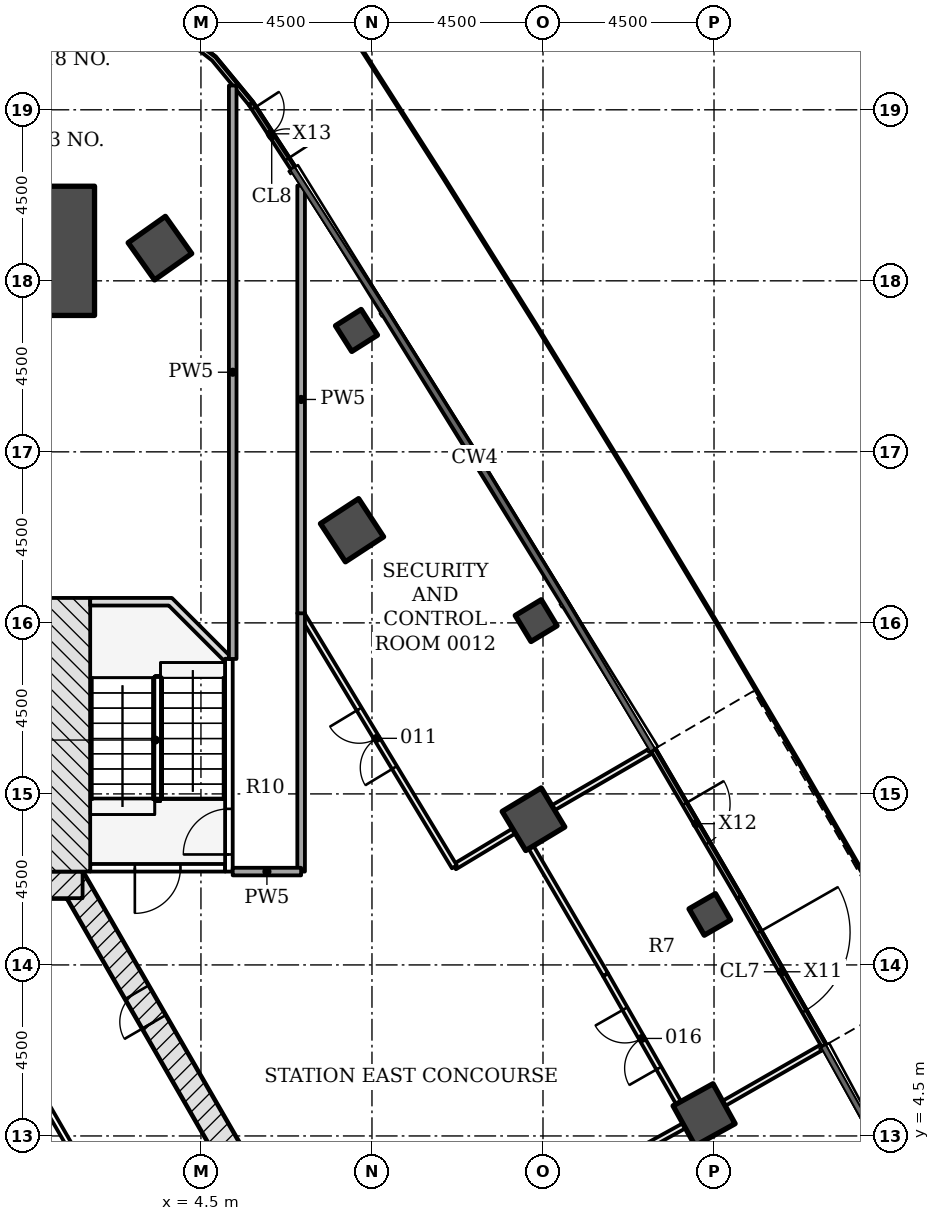
"""IFC4 building model, lengths in metres.
Left out: names, types, materials, properties, quantities, classifications, styles, units other than length and angle.
Written with IfcOpenShell. Run it as: python <this file> out.ifc"""

import sys

from ifc_helpers import new_model, si_unit, direction, frame, frame_2d, origin, origin_2d, place, context, subcontext, project, spatial, polyline, rectangle, outline, extrude, element, fill, save


model = new_model("IFC4")
c1 = context("Model", 3, precision=1e-05, world=origin(), true_north=direction((0.0, 1.0)))
c2 = subcontext(c1, "Body", "Model", "MODEL_VIEW")
j1 = project(units=[si_unit("LENGTHUNIT", "METRE"), si_unit("PLANEANGLEUNIT", "RADIAN")], contexts=[c1])
p1 = place(None, origin())
s1 = spatial("IfcSite", under=j1, at=p1, CompositionType="ELEMENT")
p2 = place(p1, origin())
s2 = spatial("IfcBuilding", under=s1, at=p2, CompositionType="ELEMENT")
p3 = place(p2, origin())
s3 = spatial("IfcBuildingStorey", under=s2, at=p3, CompositionType="ELEMENT", Elevation=0.0)
for number, where, z_axis, x_axis in (
    (1, (17.739, 5.058, -0.25), (0.0, 0.0, 1.0), (0.875, 0.484, 0.0)),
    (2, (13.25, 12.834, -0.25), (0.0, 0.0, 1.0), (0.857, 0.516, 0.0)),
    (3, (8.475, 20.438, -0.25), (0.0, 0.0, 1.0), (0.837, 0.547, 0.0)),
    (4, (3.421, 27.86, -0.25), (0.0, 0.0, 1.0), (0.816, 0.578, 0.0)),
):
    element("IfcColumn", number, at=place(p3, frame(where, z_axis=z_axis, x_axis=x_axis)), inside=s3, PredefinedType="COLUMN", context=c2, shape_type="SweptSolid", body=[
        extrude(rectangle(XDim=1.2, YDim=1.2, at=origin_2d()), origin(), (0.0, 0.0, 1.0), 6.0),
    ])
for number, where, z_axis, x_axis in (
    (5, (17.89, 10.329, -0.25), (0.0, 0.0, 1.0), (0.866, 0.5, 0.0)),
    (6, (13.32, 18.059, -0.25), (0.0, 0.0, 1.0), (0.856, 0.518, 0.0)),
    (7, (8.592, 25.695, -0.25), (0.0, 0.0, 1.0), (0.845, 0.535, 0.0)),
):
    element("IfcColumn", number, at=place(p3, frame(where, z_axis=z_axis, x_axis=x_axis)), inside=s3, PredefinedType="COLUMN", context=c2, shape_type="SweptSolid", body=[
        extrude(rectangle(XDim=0.8, YDim=0.8, at=origin_2d()), origin(), (0.0, 0.0, 1.0), 6.0),
    ])
p4 = place(p3, frame((10.311, -4.703, -0.25), z_axis=(0.0, 0.0, 1.0), x_axis=(-0.500001446645, 0.866024568562, 0.0)))
e8 = element("IfcWall", 8, at=p4, inside=s3, PredefinedType="SHEAR", context=c2, shape_type="SweptSolid", body=[
    extrude(rectangle(XDim=18.458, YDim=0.7, at=frame_2d((9.229, 0.0))), origin(), (0.0, 0.0, 1.0), 6.0),
])
p5 = place(p4, frame((8.7, 0.0, 0.25)))
e9 = element("IfcOpeningElement", 9, at=p5, cuts=e8, PredefinedType="OPENING", context=c2, shape_type="SweptSolid", body=[
    extrude(rectangle(XDim=1.0, YDim=2.1, at=frame_2d((0.5, 1.05))), frame((0.0, 0.36, 0.0), z_axis=(0.0, -1.0, 0.0), x_axis=(1.0, 0.0, 0.0)), (0.0, 0.0, 1.0), 0.72),
])
p6 = place(p4, frame((4.002, 0.0, 0.25)))
e10 = element("IfcOpeningElement", 10, at=p6, cuts=e8, PredefinedType="OPENING", context=c2, shape_type="SweptSolid", body=[
    extrude(rectangle(XDim=0.9, YDim=2.1, at=frame_2d((0.45, 1.05))), frame((0.0, 0.36, 0.0), z_axis=(0.0, -1.0, 0.0), x_axis=(1.0, 0.0, 0.0)), (0.0, 0.0, 1.0), 0.72),
])
p7 = place(p4, frame((14.093, 0.0, 0.25)))
e11 = element("IfcOpeningElement", 11, at=p7, cuts=e8, PredefinedType="OPENING", context=c2, shape_type="SweptSolid", body=[
    extrude(rectangle(XDim=0.9, YDim=2.1, at=frame_2d((0.45, 1.05))), frame((0.0, 0.36, 0.0), z_axis=(0.0, -1.0, 0.0), x_axis=(1.0, 0.0, 0.0)), (0.0, 0.0, 1.0), 0.72),
])
p8 = place(p3, frame((1.386, 11.106, -0.25), z_axis=(0.0, 0.0, 1.0), x_axis=(-1.0, 0.0, 0.0)))
e12 = element("IfcWall", 12, at=p8, inside=s3, PredefinedType="SHEAR", context=c2, shape_type="SweptSolid", body=[
    extrude(rectangle(XDim=2.771, YDim=0.7, at=frame_2d((1.386, 0.0))), origin(), (0.0, 0.0, 1.0), 6.0),
])
p9 = place(p3, frame((0.0, 27.789, -0.25), z_axis=(0.0, 0.0, 1.0), x_axis=(0.0, 1.0, 0.0)))
e13 = element("IfcColumn", 13, at=p9, inside=s3, PredefinedType="COLUMN", context=c2, shape_type="SweptSolid", body=[
    extrude(rectangle(XDim=3.4, YDim=3.4, at=origin_2d()), origin(), (0.0, 0.0, 1.0), 6.0),
])
p10 = place(p3, frame((18.661, 10.772, 0.0), z_axis=(0.0, 0.0, 1.0), x_axis=(0.495501388328, -0.868607146048, 0.0)))
e14 = element("IfcWall", 14, at=p10, inside=s3, PredefinedType="NOTDEFINED", context=c2, shape_type="SweptSolid", body=[
    extrude(rectangle(XDim=4.496, YDim=0.12, at=frame_2d((2.248, 0.0))), origin(), (0.0, 0.0, 1.0), 5.75),
])
p11 = place(p10, frame((1.048, 0.0, 0.0)))
e15 = element("IfcOpeningElement", 15, at=p11, cuts=e14, PredefinedType="OPENING", context=c2, shape_type="SweptSolid", body=[
    extrude(rectangle(XDim=2.4, YDim=2.4, at=frame_2d((1.2, 1.2))), frame((0.0, 0.07, 0.0), z_axis=(0.0, -1.0, 0.0), x_axis=(1.0, 0.0, 0.0)), (0.0, 0.0, 1.0), 0.14),
])
p12 = place(p3, frame((16.392, 14.657, 0.0), z_axis=(0.0, 0.0, 1.0), x_axis=(0.50445499627, -0.86343798662, 0.0)))
e16 = element("IfcWall", 16, at=p12, inside=s3, PredefinedType="NOTDEFINED", context=c2, shape_type="SweptSolid", body=[
    extrude(rectangle(XDim=4.496, YDim=0.12, at=frame_2d((2.248, 0.0))), origin(), (0.0, 0.0, 1.0), 5.75),
])
p13 = place(p12, frame((1.648, 0.0, 0.0)))
e17 = element("IfcOpeningElement", 17, at=p13, cuts=e16, PredefinedType="OPENING", context=c2, shape_type="SweptSolid", body=[
    extrude(rectangle(XDim=1.2, YDim=2.4, at=frame_2d((0.6, 1.2))), frame((0.0, 0.07, 0.0), z_axis=(0.0, -1.0, 0.0), x_axis=(1.0, 0.0, 0.0)), (0.0, 0.0, 1.0), 0.14),
])
p14 = place(p3, frame((5.808, 31.662, 0.0), z_axis=(0.0, 0.0, 1.0), x_axis=(0.545706549404, -0.837976349271, 0.0)))
e18 = element("IfcWall", 18, at=p14, inside=s3, PredefinedType="NOTDEFINED", context=c2, shape_type="SweptSolid", body=[
    extrude(rectangle(XDim=2.031, YDim=0.12, at=frame_2d((1.015, 0.0))), origin(), (0.0, 0.0, 1.0), 5.75),
])
p15 = place(p14, frame((0.148, 0.0, 0.0)))
e19 = element("IfcOpeningElement", 19, at=p15, cuts=e18, PredefinedType="OPENING", context=c2, shape_type="SweptSolid", body=[
    extrude(rectangle(XDim=1.6, YDim=2.4, at=frame_2d((0.8, 1.2))), frame((0.0, 0.07, 0.0), z_axis=(0.0, -1.0, 0.0), x_axis=(1.0, 0.0, 0.0)), (0.0, 0.0, 1.0), 0.14),
])
p16 = place(p3, origin())
e20 = element("IfcWall", 20, at=p16, inside=s3, PredefinedType="NOTDEFINED", context=c2, shape_type="SweptSolid", body=[
    extrude(outline(polyline([(5.857, 31.697), (4.878, 32.884), (3.663, 33.828), (2.271, 34.485), (0.769, 34.821), (-0.769, 34.821), (-2.271, 34.485), (-3.663, 33.828), (-4.878, 32.884), (-5.857, 31.697), (-5.764, 31.621), (-4.793, 32.797), (-3.6, 33.725), (-2.232, 34.37), (-0.756, 34.701), (0.756, 34.701), (2.232, 34.37), (3.6, 33.725), (4.793, 32.797), (5.764, 31.621), (5.857, 31.697)])), origin(), (0.0, 0.0, 1.0), 5.75),
])
p17 = place(p3, frame((2.099, 2.42, 0.0), z_axis=(0.0, 0.0, 1.0), x_axis=(-0.499998449073, 0.866026299211, 0.0)))
e21 = element("IfcWall", 21, at=p17, inside=s3, PredefinedType="PARTITIONING", context=c2, shape_type="SweptSolid", body=[
    extrude(rectangle(XDim=4.211, YDim=0.15, at=frame_2d((2.106, 0.0))), origin(), (0.0, 0.0, 1.0), 5.75),
])
p18 = place(p3, frame((5.135, 11.556, -0.25), z_axis=(0.0, 0.0, 1.0), x_axis=(-1.0, 0.0, 0.0)))
e22 = element("IfcWall", 22, at=p18, inside=s3, PredefinedType="SHEAR", context=c2, shape_type="SweptSolid", body=[
    extrude(rectangle(XDim=3.55, YDim=0.2, at=frame_2d((1.775, 0.0))), origin(), (0.0, 0.0, 1.0), 6.0),
])
p19 = place(p18, frame((1.175, 0.0, 0.25)))
e23 = element("IfcOpeningElement", 23, at=p19, cuts=e22, PredefinedType="OPENING", context=c2, shape_type="SweptSolid", body=[
    extrude(rectangle(XDim=1.2, YDim=2.1, at=frame_2d((0.6, 1.05))), frame((0.0, 0.11, 0.0), z_axis=(0.0, -1.0, 0.0), x_axis=(1.0, 0.0, 0.0)), (0.0, 0.0, 1.0), 0.22),
])
p20 = place(p3, frame((5.236, 11.456, -0.25), z_axis=(0.0, 0.0, 1.0), x_axis=(0.0, 1.0, 0.0)))
e24 = element("IfcWall", 24, at=p20, inside=s3, PredefinedType="SHEAR", context=c2, shape_type="SweptSolid", body=[
    extrude(rectangle(XDim=5.6, YDim=0.2, at=frame_2d((2.8, 0.0))), origin(), (0.0, 0.0, 1.0), 6.0),
])
p21 = place(p20, frame((0.45, 0.0, 0.25)))
e25 = element("IfcOpeningElement", 25, at=p21, cuts=e24, PredefinedType="OPENING", context=c2, shape_type="SweptSolid", body=[
    extrude(rectangle(XDim=1.2, YDim=2.1, at=frame_2d((0.6, 1.05))), frame((0.0, 0.11, 0.0), z_axis=(0.0, -1.0, 0.0), x_axis=(1.0, 0.0, 0.0)), (0.0, 0.0, 1.0), 0.22),
])
p22 = place(p3, frame((1.018, 11.456, -0.25), z_axis=(0.0, 0.0, 1.0), x_axis=(0.0, 1.0, 0.0)))
e26 = element("IfcWall", 26, at=p22, inside=s3, PredefinedType="SHEAR", context=c2, shape_type="SweptSolid", body=[
    extrude(rectangle(XDim=7.2, YDim=1.136, at=frame_2d((3.6, 0.0))), origin(), (0.0, 0.0, 1.0), 6.0),
])
p23 = place(p3, frame((0.0, 0.0, -0.25)))
e27 = element("IfcWall", 27, at=p23, inside=s3, PredefinedType="SHEAR", context=c2, shape_type="SweptSolid", body=[
    extrude(outline(polyline([(5.336, 17.056), (3.736, 18.656), (1.586, 18.656), (1.586, 18.456), (3.653, 18.456), (5.135, 16.974), (5.135, 17.056), (5.135, 17.056), (5.135, 17.056), (5.135, 17.056), (5.135, 17.056), (5.135, 17.056), (5.135, 17.056), (5.135, 17.056), (5.135, 17.056), (5.135, 17.056), (5.135, 17.056), (5.135, 17.056), (5.135, 17.056), (5.135, 17.056), (5.135, 17.056), (5.135, 17.056), (5.135, 17.056), (5.336, 17.056)])), origin(), (0.0, 0.0, 1.0), 6.0),
])
p24 = place(p3, frame((15.615, 3.884, 0.0), z_axis=(0.0, 0.0, 1.0), x_axis=(0.875240045644, 0.483688807501, 0.0)))
e28 = element("IfcWall", 28, at=p24, inside=s3, PredefinedType="PARTITIONING", context=c2, shape_type="SweptSolid", body=[
    extrude(rectangle(XDim=1.826, YDim=0.15, at=frame_2d((0.913, 0.0))), origin(), (0.0, 0.0, 1.0), 5.138),
])
p25 = place(p3, frame((17.068, 5.372, 0.0), z_axis=(0.0, 0.0, 1.0), x_axis=(-0.495535858124, 0.86858748167, 0.0)))
e29 = element("IfcWall", 29, at=p25, inside=s3, PredefinedType="PARTITIONING", context=c2, shape_type="SweptSolid", body=[
    extrude(rectangle(XDim=3.881, YDim=0.15, at=frame_2d((1.94, 0.0))), origin(), (0.0, 0.0, 1.0), 5.138),
])
p26 = place(p25, frame((1.05, 0.0, 0.0)))
e30 = element("IfcOpeningElement", 30, at=p26, cuts=e29, PredefinedType="OPENING", context=c2, shape_type="SweptSolid", body=[
    extrude(rectangle(XDim=1.8, YDim=2.1, at=frame_2d((0.9, 1.05))), frame((0.0, 0.085, 0.0), z_axis=(0.0, -1.0, 0.0), x_axis=(1.0, 0.0, 0.0)), (0.0, 0.0, 1.0), 0.17),
])
p27 = place(p3, frame((15.145, 8.745, 0.0), z_axis=(0.0, 0.0, 1.0), x_axis=(-0.504813441637, 0.863228468682, 0.0)))
e31 = element("IfcWall", 31, at=p27, inside=s3, PredefinedType="PARTITIONING", context=c2, shape_type="SweptSolid", body=[
    extrude(rectangle(XDim=3.881, YDim=0.15, at=frame_2d((1.94, 0.0))), origin(), (0.0, 0.0, 1.0), 5.138),
])
p28 = place(p3, frame((12.736, 12.524, 0.0), z_axis=(0.0, 0.0, 1.0), x_axis=(-0.856583818217, -0.516007909211, 0.0)))
e32 = element("IfcWall", 32, at=p28, inside=s3, PredefinedType="PARTITIONING", context=c2, shape_type="SweptSolid", body=[
    extrude(rectangle(XDim=1.827, YDim=0.15, at=frame_2d((0.914, 0.0))), origin(), (0.0, 0.0, 1.0), 5.138),
])
p29 = place(p3, frame((11.169, 11.581, 0.0), z_axis=(0.0, 0.0, 1.0), x_axis=(-0.516960400772, 0.856009313053, 0.0)))
e33 = element("IfcWall", 33, at=p29, inside=s3, PredefinedType="PARTITIONING", context=c2, shape_type="SweptSolid", body=[
    extrude(rectangle(XDim=7.801, YDim=0.15, at=frame_2d((3.901, 0.0))), origin(), (0.0, 0.0, 1.0), 5.138),
])
p30 = place(p29, frame((3.05, 0.0, 0.0)))
e34 = element("IfcOpeningElement", 34, at=p30, cuts=e33, PredefinedType="OPENING", context=c2, shape_type="SweptSolid", body=[
    extrude(rectangle(XDim=1.8, YDim=2.1, at=frame_2d((0.9, 1.05))), frame((0.0, 0.085, 0.0), z_axis=(0.0, -1.0, 0.0), x_axis=(1.0, 0.0, 0.0)), (0.0, 0.0, 1.0), 0.17),
])
p31 = place(p3, frame((7.136, 18.261, 0.0), z_axis=(0.0, 0.0, 1.0), x_axis=(0.0, -1.0, 0.0)))
e35 = element("IfcWall", 35, at=p31, inside=s3, PredefinedType="PARTITIONING", context=c2, shape_type="SweptSolid", body=[
    extrude(rectangle(XDim=6.805, YDim=0.2, at=frame_2d((3.402, 0.0))), origin(), (0.0, 0.0, 1.0), 5.138),
])
p32 = place(p3, frame((7.136, 11.456, 0.0), z_axis=(0.0, 0.0, 1.0), x_axis=(-1.0, 0.0, 0.0)))
e36 = element("IfcWall", 36, at=p32, inside=s3, PredefinedType="PARTITIONING", context=c2, shape_type="SweptSolid", body=[
    extrude(rectangle(XDim=1.8, YDim=0.2, at=frame_2d((0.9, 0.0))), origin(), (0.0, 0.0, 1.0), 5.75),
])
p33 = place(p3, frame((20.838, 6.835, 0.0), z_axis=(0.0, 0.0, 1.0), x_axis=(-0.867382463281, -0.497642102714, 0.0)))
e37 = element("IfcWall", 37, at=p33, inside=s3, PredefinedType="PARTITIONING", context=c2, shape_type="SweptSolid", body=[
    extrude(rectangle(XDim=2.972, YDim=0.15, at=frame_2d((1.486, 0.0))), origin(), (0.0, 0.0, 1.0), 5.133),
])
p34 = place(p3, frame((16.338, 14.628, 0.0), z_axis=(0.0, 0.0, 1.0), x_axis=(-0.864594359068, -0.502470490943, 0.0)))
e38 = element("IfcWall", 38, at=p34, inside=s3, PredefinedType="PARTITIONING", context=c2, shape_type="SweptSolid", body=[
    extrude(rectangle(XDim=2.971, YDim=0.15, at=frame_2d((1.486, 0.0))), origin(), (0.0, 0.0, 1.0), 5.133),
])
p35 = place(p3, frame((5.336, 17.051, 0.0), z_axis=(0.0, 0.0, 1.0), x_axis=(0.0, 1.0, 0.0)))
e39 = element("IfcWall", 39, at=p35, inside=s3, PredefinedType="PARTITIONING", context=c2, shape_type="SweptSolid", body=[
    extrude(rectangle(XDim=15.088, YDim=0.2, at=frame_2d((7.544, 0.0))), origin(), (0.0, 0.0, 1.0), 5.133),
])
p36 = place(p3, frame((7.136, 29.506, 0.0), z_axis=(0.0, 0.0, 1.0), x_axis=(0.0, -1.0, 0.0)))
e40 = element("IfcWall", 40, at=p36, inside=s3, PredefinedType="PARTITIONING", context=c2, shape_type="SweptSolid", body=[
    extrude(rectangle(XDim=11.255, YDim=0.2, at=frame_2d((5.627, 0.0))), origin(), (0.0, 0.0, 1.0), 5.133),
])
p37 = place(p11, origin())
e41 = element("IfcDoor", 41, at=p37, inside=s3, OperationType="REVOLVING", PredefinedType="DOOR", context=c2, shape_type="SweptSolid", body=[
    extrude(rectangle(XDim=2.4, YDim=2.4, at=frame_2d((1.2, 1.2))), frame((0.0, 0.025, 0.0), z_axis=(0.0, -1.0, 0.0), x_axis=(1.0, 0.0, 0.0)), (0.0, 0.0, 1.0), 0.05),
])
fill(e15, e41)
p38 = place(p13, origin())
e42 = element("IfcDoor", 42, at=p38, inside=s3, OperationType="SINGLE_SWING_LEFT", PredefinedType="DOOR", context=c2, shape_type="SweptSolid", body=[
    extrude(rectangle(XDim=1.2, YDim=2.4, at=frame_2d((0.6, 1.2))), frame((0.0, 0.025, 0.0), z_axis=(0.0, -1.0, 0.0), x_axis=(1.0, 0.0, 0.0)), (0.0, 0.0, 1.0), 0.05),
])
fill(e17, e42)
p39 = place(p15, origin())
e43 = element("IfcDoor", 43, at=p39, inside=s3, OperationType="DOUBLE_DOOR_SINGLE_SWING", PredefinedType="DOOR", context=c2, shape_type="SweptSolid", body=[
    extrude(rectangle(XDim=1.6, YDim=2.4, at=frame_2d((0.8, 1.2))), frame((0.0, 0.025, 0.0), z_axis=(0.0, -1.0, 0.0), x_axis=(1.0, 0.0, 0.0)), (0.0, 0.0, 1.0), 0.05),
])
fill(e19, e43)
p40 = place(p7, origin())
e44 = element("IfcDoor", 44, at=p40, inside=s3, OperationType="SINGLE_SWING_LEFT", PredefinedType="DOOR", context=c2, shape_type="SweptSolid", body=[
    extrude(rectangle(XDim=0.9, YDim=2.1, at=frame_2d((0.45, 1.05))), frame((0.0, 0.075, 0.0), z_axis=(0.0, -1.0, 0.0), x_axis=(1.0, 0.0, 0.0)), (0.0, 0.0, 1.0), 0.15),
])
fill(e11, e44)
p41 = place(p19, origin())
e45 = element("IfcDoor", 45, at=p41, inside=s3, OperationType="SINGLE_SWING_RIGHT", PredefinedType="DOOR", context=c2, shape_type="SweptSolid", body=[
    extrude(rectangle(XDim=1.2, YDim=2.1, at=frame_2d((0.6, 1.05))), frame((0.0, 0.025, 0.0), z_axis=(0.0, -1.0, 0.0), x_axis=(1.0, 0.0, 0.0)), (0.0, 0.0, 1.0), 0.05),
])
fill(e23, e45)
p42 = place(p21, origin())
e46 = element("IfcDoor", 46, at=p42, inside=s3, OperationType="SINGLE_SWING_LEFT", PredefinedType="DOOR", context=c2, shape_type="SweptSolid", body=[
    extrude(rectangle(XDim=1.2, YDim=2.1, at=frame_2d((0.6, 1.05))), frame((0.0, 0.025, 0.0), z_axis=(0.0, -1.0, 0.0), x_axis=(1.0, 0.0, 0.0)), (0.0, 0.0, 1.0), 0.05),
])
fill(e25, e46)
p43 = place(p30, origin())
e47 = element("IfcDoor", 47, at=p43, inside=s3, OperationType="DOUBLE_DOOR_SINGLE_SWING", PredefinedType="DOOR", context=c2, shape_type="SweptSolid", body=[
    extrude(rectangle(XDim=1.8, YDim=2.1, at=frame_2d((0.9, 1.05))), frame((0.0, 0.025, 0.0), z_axis=(0.0, -1.0, 0.0), x_axis=(1.0, 0.0, 0.0)), (0.0, 0.0, 1.0), 0.05),
])
fill(e34, e47)
p44 = place(p26, origin())
e48 = element("IfcDoor", 48, at=p44, inside=s3, OperationType="DOUBLE_DOOR_SINGLE_SWING", PredefinedType="DOOR", context=c2, shape_type="SweptSolid", body=[
    extrude(rectangle(XDim=1.8, YDim=2.1, at=frame_2d((0.9, 1.05))), frame((0.0, 0.025, 0.0), z_axis=(0.0, -1.0, 0.0), x_axis=(1.0, 0.0, 0.0)), (0.0, 0.0, 1.0), 0.05),
])
fill(e30, e48)
save(model, sys.argv[1])
